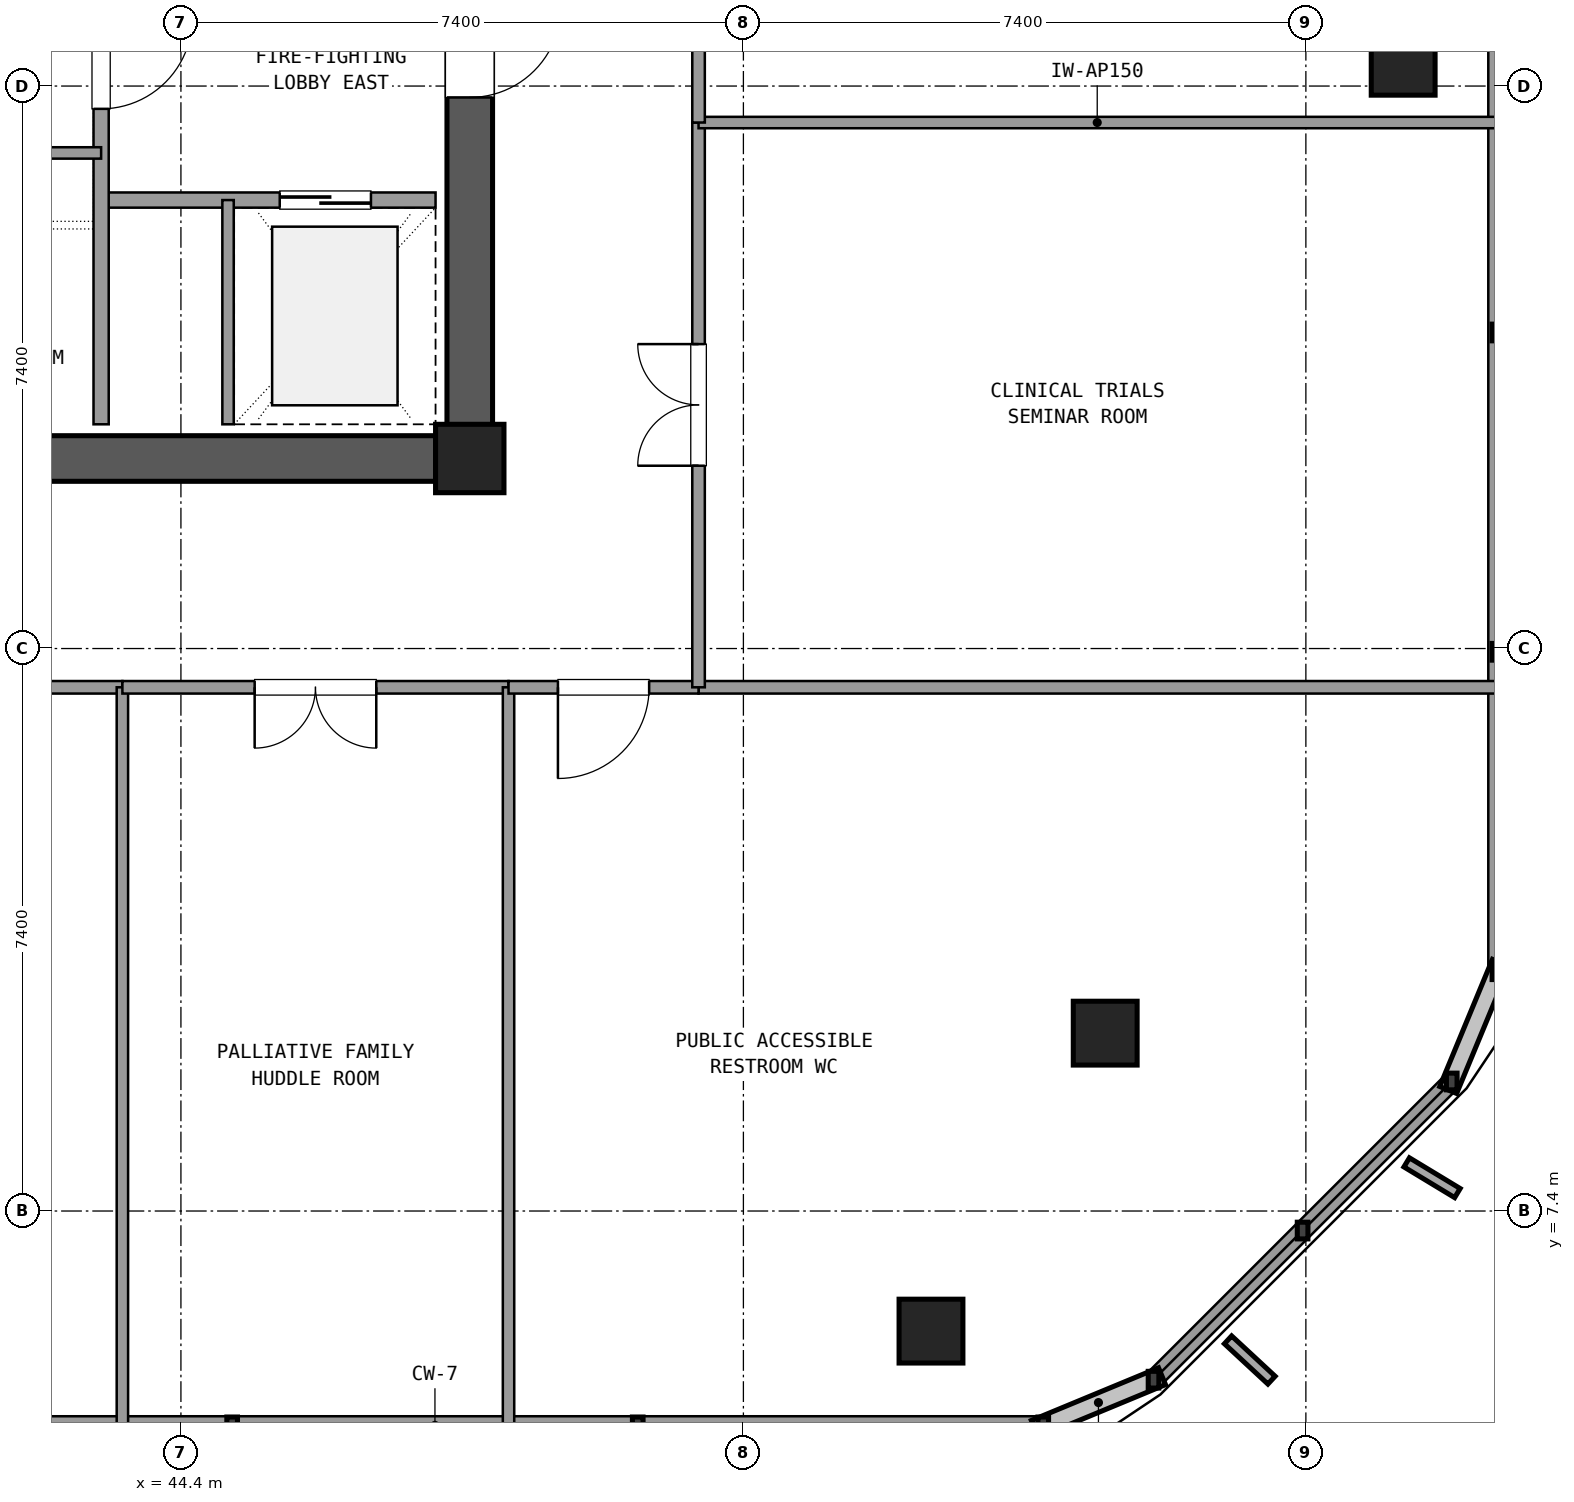
"""IFC4 building model, lengths in metres.
Left out: names, types, materials, properties, quantities, classifications, styles, units other than length and angle.
Written with IfcOpenShell. Run it as: python <this file> out.ifc"""

import sys

from ifc_helpers import new_model, si_unit, direction, frame, frame_2d, origin, origin_2d, place, context, subcontext, project, spatial, rectangle, extrude, element, fill, save


model = new_model("IFC4")
c1 = context("Model", 3, precision=1e-05, world=origin(), true_north=direction((0.0, 1.0)))
c2 = subcontext(c1, "Body", "Model", "MODEL_VIEW")
j1 = project(units=[si_unit("LENGTHUNIT", "METRE"), si_unit("PLANEANGLEUNIT", "RADIAN")], contexts=[c1])
p1 = place(None, origin())
s1 = spatial("IfcSite", under=j1, at=p1, CompositionType="ELEMENT")
p2 = place(p1, origin())
s2 = spatial("IfcBuilding", under=s1, at=p2, CompositionType="ELEMENT")
p3 = place(p2, frame((0.0, 0.0, 237.06)))
s3 = spatial("IfcBuildingStorey", under=s2, at=p3, CompositionType="ELEMENT", Elevation=237.06)
p4 = place(p3, frame((48.2, 17.3, 0.0), z_axis=(0.0, 0.0, 1.0), x_axis=(1.0, 0.0, 0.0)))
e1 = element("IfcColumn", 1, at=p4, inside=s3, PredefinedType="COLUMN", context=c2, shape_type="SweptSolid", body=[
    extrude(rectangle(XDim=0.9, YDim=0.9, at=origin_2d()), origin(), (0.0, 0.0, 1.0), 5.76),
])
p5 = place(p3, frame((37.445, 17.3, 0.0), z_axis=(0.0, 0.0, 1.0), x_axis=(1.0, 0.0, 0.0)))
e2 = element("IfcWall", 2, at=p5, inside=s3, PredefinedType="SHEAR", context=c2, shape_type="SweptSolid", body=[
    extrude(rectangle(XDim=10.31, YDim=0.6, at=frame_2d((5.155, 0.0))), origin(), (0.0, 0.0, 1.0), 5.48),
])
p6 = place(p3, frame((48.2, 17.745, 0.0), z_axis=(0.0, 0.0, 1.0), x_axis=(0.0, 1.0, 0.0)))
e3 = element("IfcWall", 3, at=p6, inside=s3, PredefinedType="SHEAR", context=c2, shape_type="SweptSolid", body=[
    extrude(rectangle(XDim=7.71, YDim=0.6, at=frame_2d((3.855, 0.0))), origin(), (0.0, 0.0, 1.0), 5.48),
])
p7 = place(p6, frame((4.305, 0.0, 0.0)))
e4 = element("IfcOpeningElement", 4, at=p7, cuts=e3, PredefinedType="OPENING", context=c2, shape_type="SweptSolid", body=[
    extrude(rectangle(XDim=1.2, YDim=2.15, at=frame_2d((0.6, 1.075))), frame((0.0, 0.31, 0.0), z_axis=(0.0, -1.0, 0.0), x_axis=(1.0, 0.0, 0.0)), (0.0, 0.0, 1.0), 0.62),
])
for number, where, z_axis, x_axis in (
    (5, (54.268, 5.82, 0.0), (0.0, 0.0, 1.0), (1.0, 0.0, 0.0)),
    (6, (56.56, 9.74, 0.0), (0.0, 0.0, 1.0), (1.0, 0.0, 0.0)),
    (7, (60.48, 22.5, 0.0), (0.0, 0.0, 1.0), (1.0, 0.0, 0.0)),
):
    element("IfcColumn", number, at=place(p3, frame(where, z_axis=z_axis, x_axis=x_axis)), inside=s3, PredefinedType="COLUMN", context=c2, shape_type="SweptSolid", body=[
        extrude(rectangle(XDim=0.84, YDim=0.84, at=origin_2d()), origin(), (0.0, 0.0, 1.0), 5.76),
    ])
p8 = place(p3, frame((39.739, 4.58, 0.0), z_axis=(0.0, 0.0, 1.0), x_axis=(1.0, 0.0, 0.0)))
e8 = element("IfcWall", 8, at=p8, inside=s3, PredefinedType="SOLIDWALL", context=c2, shape_type="SweptSolid", body=[
    extrude(rectangle(XDim=16.006, YDim=0.24, at=frame_2d((8.003, 0.0))), origin(), (0.0, 0.0, 1.0), 0.85),
])
p9 = place(p3, frame((57.196, 5.181, 0.0), z_axis=(0.0, 0.0, 1.0), x_axis=(0.707084777957, 0.707128783731, 0.0)))
e9 = element("IfcWall", 9, at=p9, inside=s3, PredefinedType="SOLIDWALL", context=c2, shape_type="SweptSolid", body=[
    extrude(rectangle(XDim=5.548, YDim=0.24, at=frame_2d((2.774, 0.0))), origin(), (0.0, 0.0, 1.0), 0.85),
])
p10 = place(p3, frame((61.72, 10.555, 0.0), z_axis=(0.0, 0.0, 1.0), x_axis=(0.0, 1.0, 0.0)))
e10 = element("IfcWall", 10, at=p10, inside=s3, PredefinedType="SOLIDWALL", context=c2, shape_type="SweptSolid", body=[
    extrude(rectangle(XDim=12.605, YDim=0.24, at=frame_2d((6.302, 0.0))), origin(), (0.0, 0.0, 1.0), 0.85),
])
p11 = place(p3, frame((43.35, 20.7, 0.0), z_axis=(0.0, 0.0, 1.0), x_axis=(1.0, 0.0, 0.0)))
e11 = element("IfcWall", 11, at=p11, inside=s3, PredefinedType="SOLIDWALL", context=c2, shape_type="SweptSolid", body=[
    extrude(rectangle(XDim=4.4, YDim=0.2, at=frame_2d((2.2, 0.0))), origin(), (0.0, 0.0, 1.0), 4.77),
])
p12 = place(p11, frame((2.35, 0.0, 0.0)))
e12 = element("IfcOpeningElement", 12, at=p12, cuts=e11, PredefinedType="OPENING", context=c2, shape_type="SweptSolid", body=[
    extrude(rectangle(XDim=1.2, YDim=2.15, at=frame_2d((0.6, 1.075))), frame((0.0, 0.11, 0.0), z_axis=(0.0, -1.0, 0.0), x_axis=(1.0, 0.0, 0.0)), (0.0, 0.0, 1.0), 0.22),
])
p13 = place(p3, frame((43.35, 17.75, 0.0), z_axis=(0.0, 0.0, 1.0), x_axis=(0.0, 1.0, 0.0)))
e13 = element("IfcWall", 13, at=p13, inside=s3, PredefinedType="SOLIDWALL", context=c2, shape_type="SweptSolid", body=[
    extrude(rectangle(XDim=6.9, YDim=0.2, at=frame_2d((3.45, 0.0))), origin(), (0.0, 0.0, 1.0), 4.77),
])
p14 = place(p13, frame((4.15, 0.0, 0.0)))
e14 = element("IfcOpeningElement", 14, at=p14, cuts=e13, PredefinedType="OPENING", context=c2, shape_type="SweptSolid", body=[
    extrude(rectangle(XDim=1.2, YDim=2.15, at=frame_2d((0.6, 1.075))), frame((0.0, 0.11, 0.0), z_axis=(0.0, -1.0, 0.0), x_axis=(1.0, 0.0, 0.0)), (0.0, 0.0, 1.0), 0.22),
])
p15 = place(p3, frame((45.02, 17.75, 0.0), z_axis=(0.0, 0.0, 1.0), x_axis=(0.0, 1.0, 0.0)))
e15 = element("IfcWall", 15, at=p15, inside=s3, PredefinedType="PARTITIONING", context=c2, shape_type="SweptSolid", body=[
    extrude(rectangle(XDim=2.95, YDim=0.15, at=frame_2d((1.475, 0.0))), origin(), (0.0, 0.0, 1.0), 4.77),
])
p16 = place(p3, frame((37.25, 21.32, 0.0), z_axis=(0.0, 0.0, 1.0), x_axis=(1.0, 0.0, 0.0)))
e16 = element("IfcWall", 16, at=p16, inside=s3, PredefinedType="PARTITIONING", context=c2, shape_type="SweptSolid", body=[
    extrude(rectangle(XDim=6.1, YDim=0.15, at=frame_2d((3.05, 0.0))), origin(), (0.0, 0.0, 1.0), 4.77),
])
p17 = place(p16, frame((0.55, 0.0, 0.0)))
e17 = element("IfcOpeningElement", 17, at=p17, cuts=e16, PredefinedType="OPENING", context=c2, shape_type="SweptSolid", body=[
    extrude(rectangle(XDim=1.0, YDim=2.15, at=frame_2d((0.5, 1.075))), frame((0.0, 0.085, 0.0), z_axis=(0.0, -1.0, 0.0), x_axis=(1.0, 0.0, 0.0)), (0.0, 0.0, 1.0), 0.17),
])
p18 = place(p16, frame((3.5, 0.0, 0.0)))
e18 = element("IfcOpeningElement", 18, at=p18, cuts=e16, PredefinedType="OPENING", context=c2, shape_type="SweptSolid", body=[
    extrude(rectangle(XDim=1.0, YDim=2.15, at=frame_2d((0.5, 1.075))), frame((0.0, 0.085, 0.0), z_axis=(0.0, -1.0, 0.0), x_axis=(1.0, 0.0, 0.0)), (0.0, 0.0, 1.0), 0.17),
])
p19 = place(p3, frame((51.21, 14.29, 0.0), z_axis=(0.0, 0.0, 1.0), x_axis=(1.0, 0.0, 0.0)))
e19 = element("IfcWall", 19, at=p19, inside=s3, PredefinedType="PARTITIONING", context=c2, shape_type="SweptSolid", body=[
    extrude(rectangle(XDim=10.49, YDim=0.165, at=frame_2d((5.245, 0.0))), origin(), (0.0, 0.0, 1.0), 4.77),
])
p20 = place(p3, frame((25.634, 14.29, 0.0), z_axis=(0.0, 0.0, 1.0), x_axis=(1.0, 0.0, 0.0)))
e20 = element("IfcWall", 20, at=p20, inside=s3, PredefinedType="PARTITIONING", context=c2, shape_type="SweptSolid", body=[
    extrude(rectangle(XDim=17.996, YDim=0.165, at=frame_2d((8.998, 0.0))), origin(), (0.0, 0.0, 1.0), 4.77),
])
p21 = place(p20, frame((8.198, 0.0, 0.0)))
e21 = element("IfcOpeningElement", 21, at=p21, cuts=e20, PredefinedType="OPENING", context=c2, shape_type="SweptSolid", body=[
    extrude(rectangle(XDim=1.6, YDim=2.2, at=frame_2d((0.8, 1.1))), frame((0.0, 0.093, 0.0), z_axis=(0.0, -1.0, 0.0), x_axis=(1.0, 0.0, 0.0)), (0.0, 0.0, 1.0), 0.185),
])
p22 = place(p3, frame((43.63, 14.29, 0.0), z_axis=(0.0, 0.0, 1.0), x_axis=(0.0, -1.0, 0.0)))
e22 = element("IfcWall", 22, at=p22, inside=s3, PredefinedType="PARTITIONING", context=c2, shape_type="SweptSolid", body=[
    extrude(rectangle(XDim=9.69, YDim=0.15, at=frame_2d((4.845, 0.0))), origin(), (0.0, 0.0, 1.0), 4.77),
])
p23 = place(p3, frame((43.63, 14.29, 0.0), z_axis=(0.0, 0.0, 1.0), x_axis=(1.0, 0.0, 0.0)))
e23 = element("IfcWall", 23, at=p23, inside=s3, PredefinedType="PARTITIONING", context=c2, shape_type="SweptSolid", body=[
    extrude(rectangle(XDim=5.08, YDim=0.165, at=frame_2d((2.54, 0.0))), origin(), (0.0, 0.0, 1.0), 4.77),
])
p24 = place(p23, frame((1.74, 0.0, 0.0)))
e24 = element("IfcOpeningElement", 24, at=p24, cuts=e23, PredefinedType="OPENING", context=c2, shape_type="SweptSolid", body=[
    extrude(rectangle(XDim=1.6, YDim=2.2, at=frame_2d((0.8, 1.1))), frame((0.0, 0.093, 0.0), z_axis=(0.0, -1.0, 0.0), x_axis=(1.0, 0.0, 0.0)), (0.0, 0.0, 1.0), 0.185),
])
p25 = place(p3, frame((48.71, 14.29, 0.0), z_axis=(0.0, 0.0, 1.0), x_axis=(0.0, -1.0, 0.0)))
e25 = element("IfcWall", 25, at=p25, inside=s3, PredefinedType="PARTITIONING", context=c2, shape_type="SweptSolid", body=[
    extrude(rectangle(XDim=9.69, YDim=0.15, at=frame_2d((4.845, 0.0))), origin(), (0.0, 0.0, 1.0), 4.77),
])
p26 = place(p3, frame((48.71, 14.29, 0.0), z_axis=(0.0, 0.0, 1.0), x_axis=(1.0, 0.0, 0.0)))
e26 = element("IfcWall", 26, at=p26, inside=s3, PredefinedType="PARTITIONING", context=c2, shape_type="SweptSolid", body=[
    extrude(rectangle(XDim=2.5, YDim=0.165, at=frame_2d((1.25, 0.0))), origin(), (0.0, 0.0, 1.0), 4.77),
])
p27 = place(p26, frame((0.65, 0.0, 0.0)))
e27 = element("IfcOpeningElement", 27, at=p27, cuts=e26, PredefinedType="OPENING", context=c2, shape_type="SweptSolid", body=[
    extrude(rectangle(XDim=1.2, YDim=2.15, at=frame_2d((0.6, 1.075))), frame((0.0, 0.093, 0.0), z_axis=(0.0, -1.0, 0.0), x_axis=(1.0, 0.0, 0.0)), (0.0, 0.0, 1.0), 0.185),
])
p28 = place(p3, frame((51.21, 14.29, 0.0), z_axis=(0.0, 0.0, 1.0), x_axis=(0.0, 1.0, 0.0)))
e28 = element("IfcWall", 28, at=p28, inside=s3, PredefinedType="PARTITIONING", context=c2, shape_type="SweptSolid", body=[
    extrude(rectangle(XDim=7.43, YDim=0.165, at=frame_2d((3.715, 0.0))), origin(), (0.0, 0.0, 1.0), 4.77),
])
p29 = place(p28, frame((2.915, 0.0, 0.0)))
e29 = element("IfcOpeningElement", 29, at=p29, cuts=e28, PredefinedType="OPENING", context=c2, shape_type="SweptSolid", body=[
    extrude(rectangle(XDim=1.6, YDim=2.2, at=frame_2d((0.8, 1.1))), frame((0.0, 0.093, 0.0), z_axis=(0.0, -1.0, 0.0), x_axis=(1.0, 0.0, 0.0)), (0.0, 0.0, 1.0), 0.185),
])
p30 = place(p3, frame((51.21, 21.72, 0.0), z_axis=(0.0, 0.0, 1.0), x_axis=(1.0, 0.0, 0.0)))
e30 = element("IfcWall", 30, at=p30, inside=s3, PredefinedType="PARTITIONING", context=c2, shape_type="SweptSolid", body=[
    extrude(rectangle(XDim=10.49, YDim=0.15, at=frame_2d((5.245, 0.0))), origin(), (0.0, 0.0, 1.0), 4.77),
])
p31 = place(p3, frame((51.21, 21.72, 0.0), z_axis=(0.0, 0.0, 1.0), x_axis=(0.0, 1.0, 0.0)))
e31 = element("IfcWall", 31, at=p31, inside=s3, PredefinedType="PARTITIONING", context=c2, shape_type="SweptSolid", body=[
    extrude(rectangle(XDim=15.79, YDim=0.165, at=frame_2d((7.895, 0.0))), origin(), (0.0, 0.0, 1.0), 4.77),
])
p32 = place(p31, frame((7.095, 0.0, 0.0)))
e32 = element("IfcOpeningElement", 32, at=p32, cuts=e31, PredefinedType="OPENING", context=c2, shape_type="SweptSolid", body=[
    extrude(rectangle(XDim=1.6, YDim=2.2, at=frame_2d((0.8, 1.1))), frame((0.0, 0.093, 0.0), z_axis=(0.0, -1.0, 0.0), x_axis=(1.0, 0.0, 0.0)), (0.0, 0.0, 1.0), 0.185),
])
p33 = place(p12, origin())
e33 = element("IfcDoor", 33, at=p33, inside=s3, OperationType="SLIDING_TO_RIGHT", PredefinedType="DOOR", context=c2, shape_type="SweptSolid", body=[
    extrude(rectangle(XDim=1.2, YDim=2.15, at=frame_2d((0.6, 1.075))), frame((0.0, 0.025, 0.0), z_axis=(0.0, -1.0, 0.0), x_axis=(1.0, 0.0, 0.0)), (0.0, 0.0, 1.0), 0.05),
])
fill(e12, e33)
p34 = place(p14, frame((1.2, 0.0, 0.0), z_axis=(0.0, 0.0, 1.0), x_axis=(-1.0, 0.0, 0.0)))
e34 = element("IfcDoor", 34, at=p34, inside=s3, OperationType="SINGLE_SWING_RIGHT", PredefinedType="DOOR", context=c2, shape_type="SweptSolid", body=[
    extrude(rectangle(XDim=1.2, YDim=2.15, at=frame_2d((0.6, 1.075))), frame((0.0, 0.025, 0.0), z_axis=(0.0, -1.0, 0.0), x_axis=(1.0, 0.0, 0.0)), (0.0, 0.0, 1.0), 0.05),
])
fill(e14, e34)
p35 = place(p7, frame((1.2, 0.0, 0.0), z_axis=(0.0, 0.0, 1.0), x_axis=(-1.0, 0.0, 0.0)))
e35 = element("IfcDoor", 35, at=p35, inside=s3, OperationType="SINGLE_SWING_RIGHT", PredefinedType="DOOR", context=c2, shape_type="SweptSolid", body=[
    extrude(rectangle(XDim=1.2, YDim=2.15, at=frame_2d((0.6, 1.075))), frame((0.0, 0.025, 0.0), z_axis=(0.0, -1.0, 0.0), x_axis=(1.0, 0.0, 0.0)), (0.0, 0.0, 1.0), 0.05),
])
fill(e4, e35)
p36 = place(p24, frame((1.6, 0.0, 0.0), z_axis=(0.0, 0.0, 1.0), x_axis=(-1.0, 0.0, 0.0)))
e36 = element("IfcDoor", 36, at=p36, inside=s3, OperationType="DOUBLE_DOOR_SINGLE_SWING", PredefinedType="DOOR", context=c2, shape_type="SweptSolid", body=[
    extrude(rectangle(XDim=1.6, YDim=2.2, at=frame_2d((0.8, 1.1))), frame((0.0, 0.025, 0.0), z_axis=(0.0, -1.0, 0.0), x_axis=(1.0, 0.0, 0.0)), (0.0, 0.0, 1.0), 0.05),
])
fill(e24, e36)
p37 = place(p27, frame((1.2, 0.0, 0.0), z_axis=(0.0, 0.0, 1.0), x_axis=(-1.0, 0.0, 0.0)))
e37 = element("IfcDoor", 37, at=p37, inside=s3, OperationType="SINGLE_SWING_LEFT", PredefinedType="DOOR", context=c2, shape_type="SweptSolid", body=[
    extrude(rectangle(XDim=1.2, YDim=2.15, at=frame_2d((0.6, 1.075))), frame((0.0, 0.025, 0.0), z_axis=(0.0, -1.0, 0.0), x_axis=(1.0, 0.0, 0.0)), (0.0, 0.0, 1.0), 0.05),
])
fill(e27, e37)
p38 = place(p29, origin())
e38 = element("IfcDoor", 38, at=p38, inside=s3, OperationType="DOUBLE_DOOR_SINGLE_SWING", PredefinedType="DOOR", context=c2, shape_type="SweptSolid", body=[
    extrude(rectangle(XDim=1.6, YDim=2.2, at=frame_2d((0.8, 1.1))), frame((0.0, 0.025, 0.0), z_axis=(0.0, -1.0, 0.0), x_axis=(1.0, 0.0, 0.0)), (0.0, 0.0, 1.0), 0.05),
])
fill(e29, e38)
save(model, sys.argv[1])
